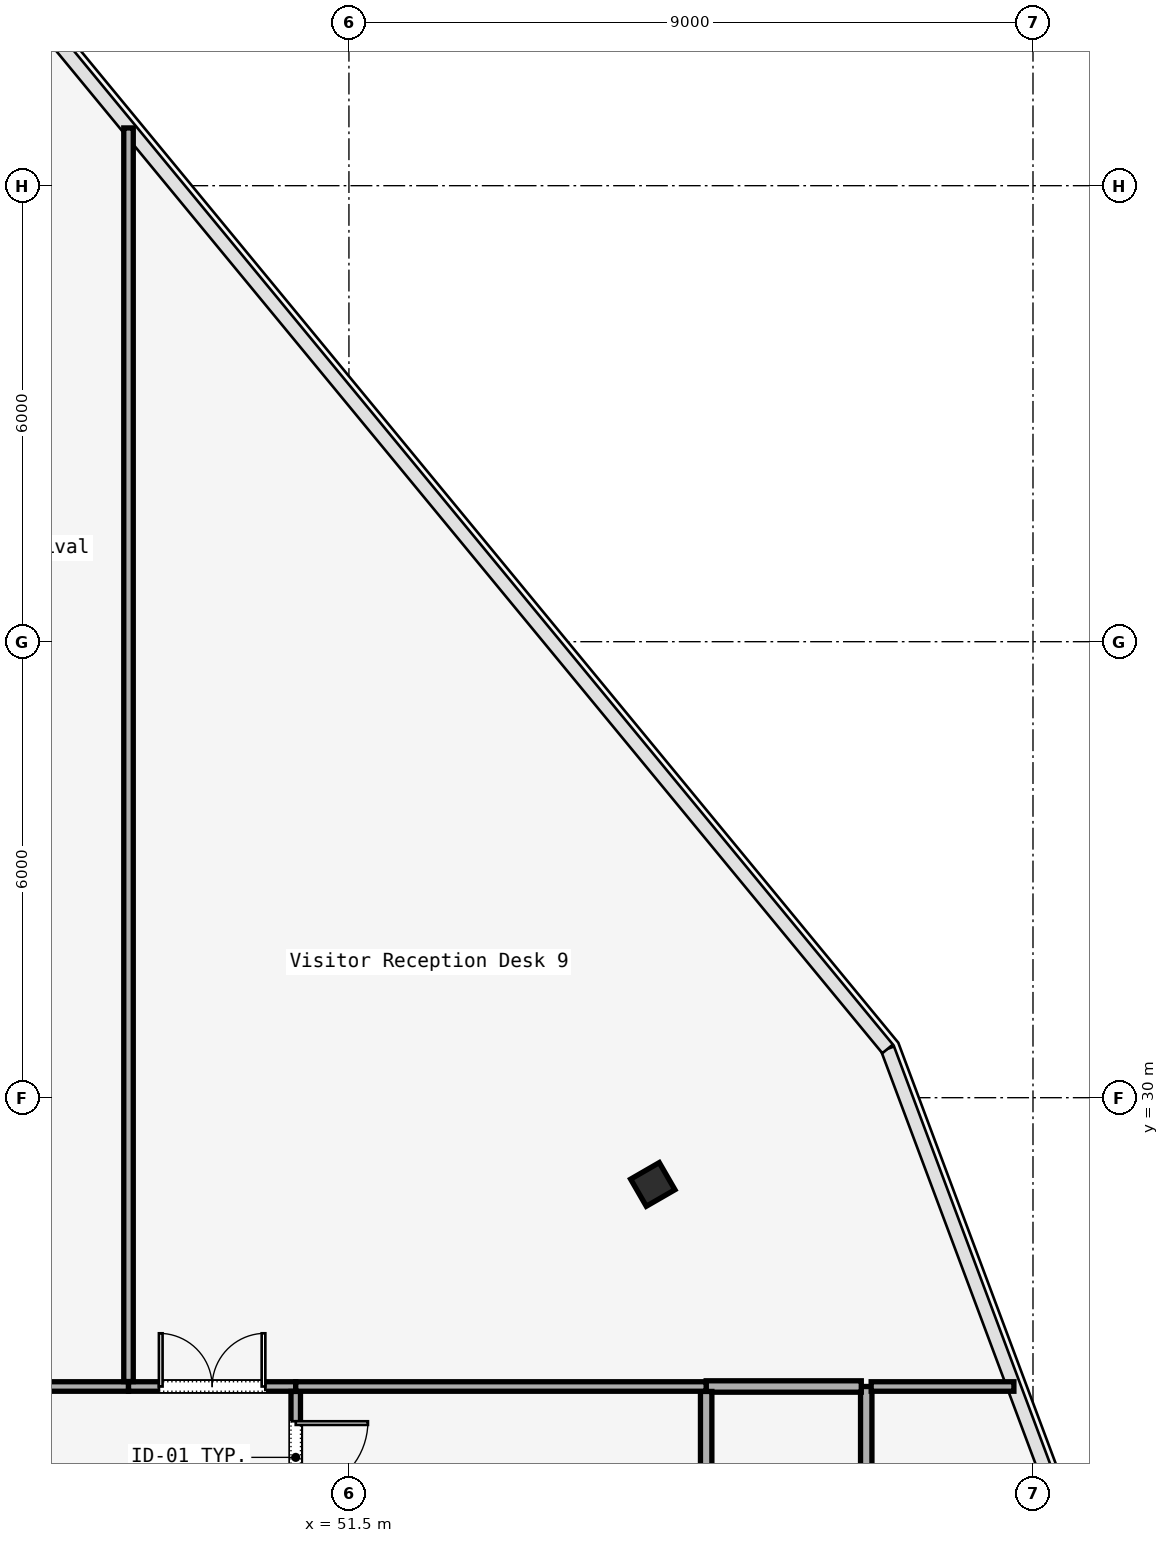
"""IFC4 building model, lengths in metres.
Left out: names, types, materials, properties, quantities, classifications, styles, units other than length and angle.
Written with IfcOpenShell. Run it as: python <this file> out.ifc"""

import sys

from ifc_helpers import new_model, si_unit, direction, frame, frame_2d, origin, origin_2d, place, context, subcontext, project, spatial, rectangle, i_section, extrude, element, fill, save


model = new_model("IFC4")
c1 = context("Model", 3, precision=1e-05, world=origin(), true_north=direction((0.0, 1.0)))
c2 = subcontext(c1, "Body", "Model", "MODEL_VIEW")
j1 = project(units=[si_unit("LENGTHUNIT", "METRE"), si_unit("PLANEANGLEUNIT", "RADIAN")], contexts=[c1])
p1 = place(None, origin())
s1 = spatial("IfcSite", under=j1, at=p1, CompositionType="ELEMENT")
p2 = place(p1, origin())
s2 = spatial("IfcBuilding", under=s1, at=p2, CompositionType="ELEMENT")
p3 = place(p2, frame((0.0, 0.0, 208.4)))
s3 = spatial("IfcBuildingStorey", under=s2, at=p3, CompositionType="ELEMENT", Elevation=208.4)
p4 = place(p3, frame((55.498, 28.859, 0.0), z_axis=(0.0, 0.0, 1.0), x_axis=(-0.5, 0.866025403784, 0.0)))
e1 = element("IfcColumn", 1, at=p4, inside=s3, PredefinedType="COLUMN", context=c2, shape_type="SweptSolid", body=[
    extrude(i_section(OverallWidth=0.412, OverallDepth=0.435, WebThickness=0.036, FlangeThickness=0.044, FilletRadius=0.015, at=origin_2d()), origin(), (0.0, 0.0, 1.0), 4.52),
])
p5 = place(p3, frame((44.97, 26.2, 0.0), z_axis=(0.0, 0.0, 1.0), x_axis=(1.0, 0.0, 0.0)))
e2 = element("IfcWall", 2, at=p5, inside=s3, PredefinedType="PARTITIONING", context=c2, shape_type="SweptSolid", body=[
    extrude(rectangle(XDim=3.63, YDim=0.125, at=frame_2d((1.815, 0.0))), origin(), (0.0, 0.0, 1.0), 3.39),
])
p6 = place(p5, frame((1.34, 0.0, 0.0)))
e3 = element("IfcOpeningElement", 3, at=p6, cuts=e2, PredefinedType="OPENING", context=c2, shape_type="SweptSolid", body=[
    extrude(rectangle(XDim=0.95, YDim=2.2, at=frame_2d((0.475, 1.1))), frame((0.0, 0.062, 0.0), z_axis=(0.0, -1.0, 0.0), x_axis=(1.0, 0.0, 0.0)), (0.0, 0.0, 1.0), 0.125),
])
p7 = place(p3, frame((48.6, 26.2, 0.0), z_axis=(0.0, 0.0, 1.0), x_axis=(1.0, 0.0, 0.0)))
e4 = element("IfcWall", 4, at=p7, inside=s3, PredefinedType="PARTITIONING", context=c2, shape_type="SweptSolid", body=[
    extrude(rectangle(XDim=2.2, YDim=0.125, at=frame_2d((1.1, 0.0))), origin(), (0.0, 0.0, 1.0), 3.39),
])
p8 = place(p7, frame((0.4, 0.0, 0.0)))
e5 = element("IfcOpeningElement", 5, at=p8, cuts=e4, PredefinedType="OPENING", context=c2, shape_type="SweptSolid", body=[
    extrude(rectangle(XDim=1.4, YDim=2.2, at=frame_2d((0.7, 1.1))), frame((0.0, 0.062, 0.0), z_axis=(0.0, -1.0, 0.0), x_axis=(1.0, 0.0, 0.0)), (0.0, 0.0, 1.0), 0.125),
])
p9 = place(p3, frame((50.8, 26.135, 0.0), z_axis=(0.0, 0.0, 1.0), x_axis=(0.0, -1.0, 0.0)))
e6 = element("IfcWall", 6, at=p9, inside=s3, PredefinedType="PARTITIONING", context=c2, shape_type="SweptSolid", body=[
    extrude(rectangle(XDim=1.735, YDim=0.125, at=frame_2d((0.868, 0.0))), origin(), (0.0, 0.0, 1.0), 3.39),
])
p10 = place(p9, frame((0.393, 0.0, 0.0)))
e7 = element("IfcOpeningElement", 7, at=p10, cuts=e6, PredefinedType="OPENING", context=c2, shape_type="SweptSolid", body=[
    extrude(rectangle(XDim=0.95, YDim=2.2, at=frame_2d((0.475, 1.1))), frame((0.0, 0.062, 0.0), z_axis=(0.0, -1.0, 0.0), x_axis=(1.0, 0.0, 0.0)), (0.0, 0.0, 1.0), 0.125),
])
p11 = place(p3, frame((58.306, 17.065, 0.0), z_axis=(0.0, 0.0, 1.0), x_axis=(0.0, 1.0, 0.0)))
e8 = element("IfcWall", 8, at=p11, inside=s3, PredefinedType="PARTITIONING", context=c2, shape_type="SweptSolid", body=[
    extrude(rectangle(XDim=9.135, YDim=0.15, at=frame_2d((4.567, 0.0))), origin(), (0.0, 0.0, 1.0), 3.39),
])
p12 = place(p3, frame((58.371, 26.2, 0.0), z_axis=(0.0, 0.0, 1.0), x_axis=(1.0, 0.0, 0.0)))
e9 = element("IfcWall", 9, at=p12, inside=s3, PredefinedType="PARTITIONING", context=c2, shape_type="SweptSolid", body=[
    extrude(rectangle(XDim=1.878, YDim=0.125, at=frame_2d((0.939, 0.0))), origin(), (0.0, 0.0, 1.0), 3.39),
])
p13 = place(p3, frame((56.2, 26.2, 0.0), z_axis=(0.0, 0.0, 1.0), x_axis=(1.0, 0.0, 0.0)))
e10 = element("IfcWall", 10, at=p13, inside=s3, PredefinedType="PARTITIONING", context=c2, shape_type="SweptSolid", body=[
    extrude(rectangle(XDim=2.041, YDim=0.15, at=frame_2d((1.021, 0.0))), origin(), (0.0, 0.0, 1.0), 3.39),
])
p14 = place(p3, frame((56.2, 21.205, 0.0), z_axis=(0.0, 0.0, 1.0), x_axis=(0.0, 1.0, 0.0)))
e11 = element("IfcWall", 11, at=p14, inside=s3, PredefinedType="PARTITIONING", context=c2, shape_type="SweptSolid", body=[
    extrude(rectangle(XDim=4.93, YDim=0.15, at=frame_2d((2.465, 0.0))), origin(), (0.0, 0.0, 1.0), 3.39),
])
p15 = place(p3, frame((50.8, 26.2, 0.0), z_axis=(0.0, 0.0, 1.0), x_axis=(1.0, 0.0, 0.0)))
e12 = element("IfcWall", 12, at=p15, inside=s3, PredefinedType="PARTITIONING", context=c2, shape_type="SweptSolid", body=[
    extrude(rectangle(XDim=5.4, YDim=0.125, at=frame_2d((2.7, 0.0))), origin(), (0.0, 0.0, 1.0), 3.39),
])
p16 = place(p3, frame((48.6, 26.265, 0.0), z_axis=(0.0, 0.0, 1.0), x_axis=(0.0, 1.0, 0.0)))
e13 = element("IfcWall", 13, at=p16, inside=s3, PredefinedType="PARTITIONING", context=c2, shape_type="SweptSolid", body=[
    extrude(rectangle(XDim=16.495, YDim=0.125, at=frame_2d((8.248, 0.0))), origin(), (0.0, 0.0, 1.0), 3.39),
])
p17 = place(p10, origin())
e14 = element("IfcDoor", 14, at=p17, inside=s3, OperationType="SINGLE_SWING_LEFT", PredefinedType="DOOR", context=c2, shape_type="SweptSolid", body=[
    extrude(rectangle(XDim=0.95, YDim=2.2, at=frame_2d((0.475, 1.1))), frame((0.0, 0.025, 0.0), z_axis=(0.0, -1.0, 0.0), x_axis=(1.0, 0.0, 0.0)), (0.0, 0.0, 1.0), 0.05),
])
fill(e7, e14)
p18 = place(p8, origin())
e15 = element("IfcDoor", 15, at=p18, inside=s3, OperationType="SINGLE_SWING_RIGHT", PredefinedType="DOOR", context=c2, shape_type="SweptSolid", body=[
    extrude(rectangle(XDim=1.4, YDim=2.2, at=frame_2d((0.7, 1.1))), frame((0.0, 0.025, 0.0), z_axis=(0.0, -1.0, 0.0), x_axis=(1.0, 0.0, 0.0)), (0.0, 0.0, 1.0), 0.05),
])
fill(e5, e15)
save(model, sys.argv[1])
